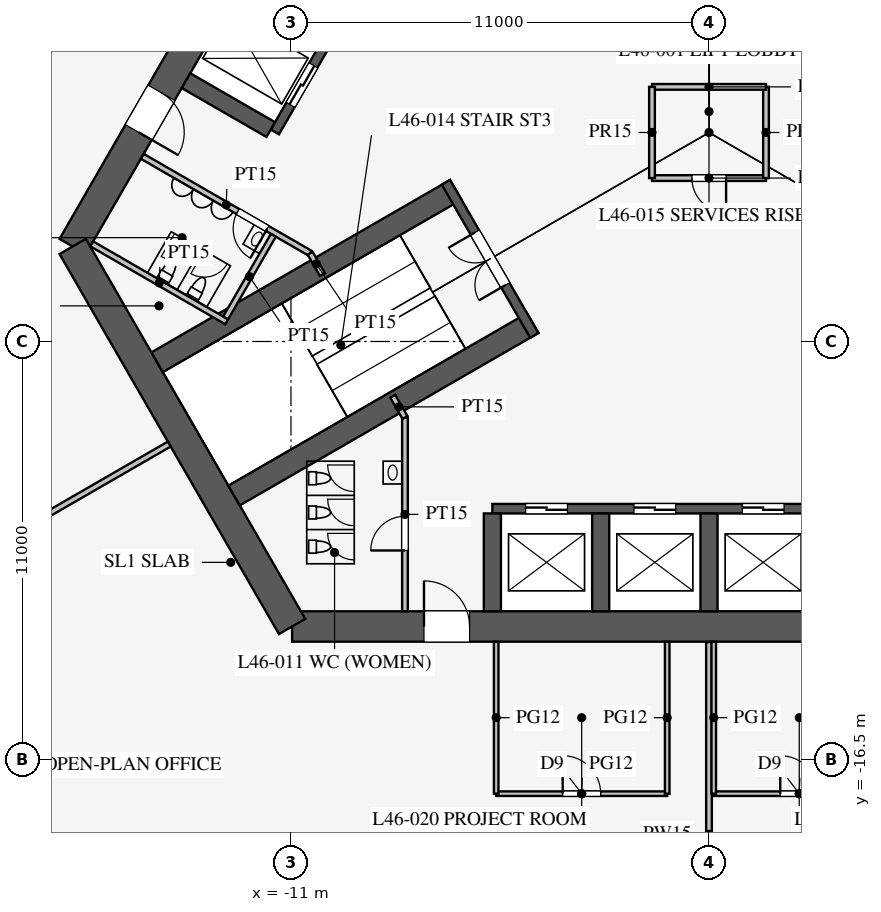
"""IFC4 building model, lengths in metres.
Left out: names, types, materials, properties, quantities, classifications, styles, units other than length and angle.
Written with IfcOpenShell. Run it as: python <this file> out.ifc"""

import sys

from ifc_helpers import new_model, si_unit, direction, frame, frame_2d, origin, place, context, subcontext, project, spatial, rectangle, extrude, element, fill, save


model = new_model("IFC4")
c1 = context("Model", 3, precision=1e-05, world=origin(), true_north=direction((0.0, 1.0)))
c2 = subcontext(c1, "Body", "Model", "MODEL_VIEW")
j1 = project(units=[si_unit("LENGTHUNIT", "METRE"), si_unit("PLANEANGLEUNIT", "RADIAN")], contexts=[c1])
p1 = place(None, origin())
s1 = spatial("IfcSite", under=j1, at=p1, CompositionType="ELEMENT")
p2 = place(p1, origin())
s2 = spatial("IfcBuilding", under=s1, at=p2, CompositionType="ELEMENT")
p3 = place(p2, frame((0.0, 0.0, 202.3)))
s3 = spatial("IfcBuildingStorey", under=s2, at=p3, CompositionType="ELEMENT", Elevation=202.3)
p4 = place(p3, frame((-10.97, -13.0, 0.0), z_axis=(0.0, 0.0, 1.0), x_axis=(1.0, 0.0, 0.0)))
e1 = element("IfcWall", 1, at=p4, inside=s3, PredefinedType="SHEAR", context=c2, shape_type="SweptSolid", body=[
    extrude(rectangle(XDim=21.939, YDim=0.8, at=frame_2d((10.97, 0.0))), origin(), (0.0, 0.0, 1.0), 4.2),
])
p5 = place(p4, frame((17.27, 0.0, 0.0)))
e2 = element("IfcOpeningElement", 2, at=p5, cuts=e1, PredefinedType="OPENING", context=c2, shape_type="SweptSolid", body=[
    extrude(rectangle(XDim=1.2, YDim=2.1, at=frame_2d((0.6, 1.05))), frame((0.0, 0.41, 0.0), z_axis=(0.0, -1.0, 0.0), x_axis=(1.0, 0.0, 0.0)), (0.0, 0.0, 1.0), 0.82),
])
p6 = place(p4, frame((3.47, 0.0, 0.0)))
e3 = element("IfcOpeningElement", 3, at=p6, cuts=e1, PredefinedType="OPENING", context=c2, shape_type="SweptSolid", body=[
    extrude(rectangle(XDim=1.2, YDim=2.1, at=frame_2d((0.6, 1.05))), frame((0.0, 0.41, 0.0), z_axis=(0.0, -1.0, 0.0), x_axis=(1.0, 0.0, 0.0)), (0.0, 0.0, 1.0), 0.82),
])
p7 = place(p3, frame((-5.773, 16.0, 0.0), z_axis=(0.0, 0.0, 1.0), x_axis=(-0.500002442456, -0.866023993627, 0.0)))
e4 = element("IfcWall", 4, at=p7, inside=s3, PredefinedType="SHEAR", context=c2, shape_type="SweptSolid", body=[
    extrude(rectangle(XDim=21.939, YDim=0.8, at=frame_2d((10.97, 0.0))), origin(), (0.0, 0.0, 1.0), 4.2),
])
p8 = place(p7, frame((17.27, 0.0, 0.0)))
e5 = element("IfcOpeningElement", 5, at=p8, cuts=e4, PredefinedType="OPENING", context=c2, shape_type="SweptSolid", body=[
    extrude(rectangle(XDim=1.2, YDim=2.1, at=frame_2d((0.6, 1.05))), frame((0.0, 0.41, 0.0), z_axis=(0.0, -1.0, 0.0), x_axis=(1.0, 0.0, 0.0)), (0.0, 0.0, 1.0), 0.82),
])
p9 = place(p7, frame((3.47, 0.0, 0.0)))
e6 = element("IfcOpeningElement", 6, at=p9, cuts=e4, PredefinedType="OPENING", context=c2, shape_type="SweptSolid", body=[
    extrude(rectangle(XDim=1.2, YDim=2.1, at=frame_2d((0.6, 1.05))), frame((0.0, 0.41, 0.0), z_axis=(0.0, -1.0, 0.0), x_axis=(1.0, 0.0, 0.0)), (0.0, 0.0, 1.0), 0.82),
])
p10 = place(p3, frame((-16.743, -3.0, 0.0), z_axis=(0.0, 0.0, 1.0), x_axis=(0.499995765644, -0.866027848477, 0.0)))
e7 = element("IfcWall", 7, at=p10, inside=s3, PredefinedType="SHEAR", context=c2, shape_type="SweptSolid", body=[
    extrude(rectangle(XDim=11.547, YDim=0.8, at=frame_2d((5.773, 0.0))), origin(), (0.0, 0.0, 1.0), 4.2),
])
p11 = place(p3, frame((-5.7, -9.9, 0.0), z_axis=(0.0, 0.0, 1.0), x_axis=(1.0, 0.0, 0.0)))
e8 = element("IfcWall", 8, at=p11, inside=s3, PredefinedType="SHEAR", context=c2, shape_type="SweptSolid", body=[
    extrude(rectangle(XDim=11.4, YDim=0.25, at=frame_2d((5.7, 0.0))), origin(), (0.0, 0.0, 1.0), 4.2),
])
p12 = place(p11, frame((0.875, 0.0, 0.0)))
e9 = element("IfcOpeningElement", 9, at=p12, cuts=e8, PredefinedType="OPENING", context=c2, shape_type="SweptSolid", body=[
    extrude(rectangle(XDim=1.1, YDim=2.2, at=frame_2d((0.55, 1.1))), frame((0.0, 0.135, 0.0), z_axis=(0.0, -1.0, 0.0), x_axis=(1.0, 0.0, 0.0)), (0.0, 0.0, 1.0), 0.27),
])
p13 = place(p11, frame((3.725, 0.0, 0.0)))
e10 = element("IfcOpeningElement", 10, at=p13, cuts=e8, PredefinedType="OPENING", context=c2, shape_type="SweptSolid", body=[
    extrude(rectangle(XDim=1.1, YDim=2.2, at=frame_2d((0.55, 1.1))), frame((0.0, 0.135, 0.0), z_axis=(0.0, -1.0, 0.0), x_axis=(1.0, 0.0, 0.0)), (0.0, 0.0, 1.0), 0.27),
])
p14 = place(p11, frame((6.575, 0.0, 0.0)))
e11 = element("IfcOpeningElement", 11, at=p14, cuts=e8, PredefinedType="OPENING", context=c2, shape_type="SweptSolid", body=[
    extrude(rectangle(XDim=1.1, YDim=2.2, at=frame_2d((0.55, 1.1))), frame((0.0, 0.135, 0.0), z_axis=(0.0, -1.0, 0.0), x_axis=(1.0, 0.0, 0.0)), (0.0, 0.0, 1.0), 0.27),
])
p15 = place(p11, frame((9.425, 0.0, 0.0)))
e12 = element("IfcOpeningElement", 12, at=p15, cuts=e8, PredefinedType="OPENING", context=c2, shape_type="SweptSolid", body=[
    extrude(rectangle(XDim=1.1, YDim=2.2, at=frame_2d((0.55, 1.1))), frame((0.0, 0.135, 0.0), z_axis=(0.0, -1.0, 0.0), x_axis=(1.0, 0.0, 0.0)), (0.0, 0.0, 1.0), 0.27),
])
for number, where, z_axis, x_axis in (
    (13, (-5.7, -10.025, 0.0), (0.0, 0.0, 1.0), (0.0, -1.0, 0.0)),
    (14, (-2.85, -10.025, 0.0), (0.0, 0.0, 1.0), (0.0, -1.0, 0.0)),
    (15, (0.0, -10.025, 0.0), (0.0, 0.0, 1.0), (0.0, -1.0, 0.0)),
):
    element("IfcWall", number, at=place(p3, frame(where, z_axis=z_axis, x_axis=x_axis)), inside=s3, PredefinedType="SHEAR", context=c2, shape_type="SweptSolid", body=[
        extrude(rectangle(XDim=2.575, YDim=0.45, at=frame_2d((1.288, 0.0))), origin(), (0.0, 0.0, 1.0), 4.2),
    ])
p16 = place(p3, frame((-5.724, 9.886, 0.0), z_axis=(0.0, 0.0, 1.0), x_axis=(-0.500001763848, -0.866024385424, 0.0)))
e16 = element("IfcWall", 16, at=p16, inside=s3, PredefinedType="SHEAR", context=c2, shape_type="SweptSolid", body=[
    extrude(rectangle(XDim=11.4, YDim=0.25, at=frame_2d((5.7, 0.0))), origin(), (0.0, 0.0, 1.0), 4.2),
])
p17 = place(p16, frame((6.525, 0.0, 0.0)))
e17 = element("IfcOpeningElement", 17, at=p17, cuts=e16, PredefinedType="OPENING", context=c2, shape_type="SweptSolid", body=[
    extrude(rectangle(XDim=1.2, YDim=2.2, at=frame_2d((0.6, 1.1))), frame((0.0, 0.135, 0.0), z_axis=(0.0, -1.0, 0.0), x_axis=(1.0, 0.0, 0.0)), (0.0, 0.0, 1.0), 0.27),
])
p18 = place(p16, frame((9.375, 0.0, 0.0)))
e18 = element("IfcOpeningElement", 18, at=p18, cuts=e16, PredefinedType="OPENING", context=c2, shape_type="SweptSolid", body=[
    extrude(rectangle(XDim=1.2, YDim=2.2, at=frame_2d((0.6, 1.1))), frame((0.0, 0.135, 0.0), z_axis=(0.0, -1.0, 0.0), x_axis=(1.0, 0.0, 0.0)), (0.0, 0.0, 1.0), 0.27),
])
p19 = place(p3, frame((-11.532, 0.076, 0.0), z_axis=(0.0, 0.0, 1.0), x_axis=(-0.866005588531, 0.500034319456, 0.0)))
e19 = element("IfcWall", 19, at=p19, inside=s3, PredefinedType="SHEAR", context=c2, shape_type="SweptSolid", body=[
    extrude(rectangle(XDim=2.575, YDim=0.45, at=frame_2d((1.288, 0.0))), origin(), (0.0, 0.0, 1.0), 4.2),
])
for number, where, z_axis, x_axis in (
    (20, (-6.663, -1.509, 0.0), (0.0, 0.0, 1.0), (-0.866, -0.5, 0.0)),
    (21, (-4.638, -5.016, 0.0), (0.0, 0.0, 1.0), (-0.866, -0.5, 0.0)),
):
    element("IfcWall", number, at=place(p3, frame(where, z_axis=z_axis, x_axis=x_axis)), inside=s3, PredefinedType="SHEAR", context=c2, shape_type="SweptSolid", body=[
        extrude(rectangle(XDim=9.075, YDim=0.6, at=frame_2d((4.538, 0.0))), origin(), (0.0, 0.0, 1.0), 4.2),
    ])
p20 = place(p3, frame((-6.922, -1.312, 0.0), z_axis=(0.0, 0.0, 1.0), x_axis=(0.499984536904, -0.866034331223, 0.0)))
e22 = element("IfcWall", 22, at=p20, inside=s3, PredefinedType="SHEAR", context=c2, shape_type="SweptSolid", body=[
    extrude(rectangle(XDim=4.65, YDim=0.25, at=frame_2d((2.325, 0.0))), origin(), (0.0, 0.0, 1.0), 4.2),
])
p21 = place(p20, frame((1.525, 0.0, 0.0)))
e23 = element("IfcOpeningElement", 23, at=p21, cuts=e22, PredefinedType="OPENING", context=c2, shape_type="SweptSolid", body=[
    extrude(rectangle(XDim=1.6, YDim=2.1, at=frame_2d((0.8, 1.05))), frame((0.0, 0.135, 0.0), z_axis=(0.0, -1.0, 0.0), x_axis=(1.0, 0.0, 0.0)), (0.0, 0.0, 1.0), 0.27),
])
p22 = place(p3, frame((-8.0, -7.5, 0.0), z_axis=(0.0, 0.0, 1.0), x_axis=(0.0, -1.0, 0.0)))
e24 = element("IfcWall", 24, at=p22, inside=s3, PredefinedType="PARTITIONING", context=c2, shape_type="SweptSolid", body=[
    extrude(rectangle(XDim=5.1, YDim=0.15, at=frame_2d((2.55, 0.0))), origin(), (0.0, 0.0, 1.0), 4.0),
])
p23 = place(p22, frame((2.6, 0.0, 0.0)))
e25 = element("IfcOpeningElement", 25, at=p23, cuts=e24, PredefinedType="OPENING", context=c2, shape_type="SweptSolid", body=[
    extrude(rectangle(XDim=0.9, YDim=2.1, at=frame_2d((0.45, 1.05))), frame((0.0, 0.085, 0.0), z_axis=(0.0, -1.0, 0.0), x_axis=(1.0, 0.0, 0.0)), (0.0, 0.0, 1.0), 0.17),
])
p24 = place(p3, frame((-10.495, -3.178, 0.0), z_axis=(0.0, 0.0, 1.0), x_axis=(-0.86602216432, 0.500005610874, 0.0)))
e26 = element("IfcWall", 26, at=p24, inside=s3, PredefinedType="PARTITIONING", context=c2, shape_type="SweptSolid", body=[
    extrude(rectangle(XDim=5.1, YDim=0.15, at=frame_2d((2.55, 0.0))), origin(), (0.0, 0.0, 1.0), 4.0),
])
p25 = place(p24, frame((1.3, 0.0, 0.0)))
e27 = element("IfcOpeningElement", 27, at=p25, cuts=e26, PredefinedType="OPENING", context=c2, shape_type="SweptSolid", body=[
    extrude(rectangle(XDim=0.9, YDim=2.1, at=frame_2d((0.45, 1.05))), frame((0.0, 0.085, 0.0), z_axis=(0.0, -1.0, 0.0), x_axis=(1.0, 0.0, 0.0)), (0.0, 0.0, 1.0), 0.17),
])
for number, where, z_axis, x_axis in (
    (28, (-10.495, -3.178, 0.0), (0.0, 0.0, 1.0), (0.5, -0.866, 0.0)),
    (29, (-8.0, -7.5, 0.0), (0.0, 0.0, 1.0), (-0.5, 0.866, 0.0)),
):
    element("IfcWall", number, at=place(p3, frame(where, z_axis=z_axis, x_axis=x_axis)), inside=s3, PredefinedType="PARTITIONING", context=c2, shape_type="SweptSolid", body=[
        extrude(rectangle(XDim=0.645, YDim=0.15, at=frame_2d((0.323, 0.0))), origin(), (0.0, 0.0, 1.0), 4.0),
    ])
p26 = place(p3, frame((-12.691, -4.982, 0.0), z_axis=(0.0, 0.0, 1.0), x_axis=(-0.8660249478, 0.500000789788, 0.0)))
e30 = element("IfcWall", 30, at=p26, inside=s3, PredefinedType="PARTITIONING", context=c2, shape_type="SweptSolid", body=[
    extrude(rectangle(XDim=4.1, YDim=0.15, at=frame_2d((2.05, 0.0))), origin(), (0.0, 0.0, 1.0), 4.0),
])
p27 = place(p3, frame((-11.464, -2.706, 0.0), z_axis=(0.0, 0.0, 1.0), x_axis=(-0.50001992892, -0.866013897511, 0.0)))
e31 = element("IfcWall", 31, at=p27, inside=s3, PredefinedType="PARTITIONING", context=c2, shape_type="SweptSolid", body=[
    extrude(rectangle(XDim=2.51, YDim=0.15, at=frame_2d((1.255, 0.0))), origin(), (0.0, 0.0, 1.0), 4.0),
])
p28 = place(p3, frame((-1.5, -1.2, 0.0), z_axis=(0.0, 0.0, 1.0), x_axis=(1.0, 0.0, 0.0)))
e32 = element("IfcWall", 32, at=p28, inside=s3, PredefinedType="PARTITIONING", context=c2, shape_type="SweptSolid", body=[
    extrude(rectangle(XDim=3.0, YDim=0.15, at=frame_2d((1.5, 0.0))), origin(), (0.0, 0.0, 1.0), 4.0),
])
p29 = place(p28, frame((1.05, 0.0, 0.0)))
e33 = element("IfcOpeningElement", 33, at=p29, cuts=e32, PredefinedType="OPENING", context=c2, shape_type="SweptSolid", body=[
    extrude(rectangle(XDim=0.9, YDim=2.1, at=frame_2d((0.45, 1.05))), frame((0.0, 0.085, 0.0), z_axis=(0.0, -1.0, 0.0), x_axis=(1.0, 0.0, 0.0)), (0.0, 0.0, 1.0), 0.17),
])
p30 = place(p3, frame((1.5, -1.2, 0.0), z_axis=(0.0, 0.0, 1.0), x_axis=(0.0, 1.0, 0.0)))
e34 = element("IfcWall", 34, at=p30, inside=s3, PredefinedType="PARTITIONING", context=c2, shape_type="SweptSolid", body=[
    extrude(rectangle(XDim=2.4, YDim=0.15, at=frame_2d((1.2, 0.0))), origin(), (0.0, 0.0, 1.0), 4.0),
])
p31 = place(p3, frame((1.5, 1.2, 0.0), z_axis=(0.0, 0.0, 1.0), x_axis=(-1.0, 0.0, 0.0)))
e35 = element("IfcWall", 35, at=p31, inside=s3, PredefinedType="PARTITIONING", context=c2, shape_type="SweptSolid", body=[
    extrude(rectangle(XDim=3.0, YDim=0.15, at=frame_2d((1.5, 0.0))), origin(), (0.0, 0.0, 1.0), 4.0),
])
p32 = place(p3, frame((-1.5, 1.2, 0.0), z_axis=(0.0, 0.0, 1.0), x_axis=(0.0, -1.0, 0.0)))
e36 = element("IfcWall", 36, at=p32, inside=s3, PredefinedType="PARTITIONING", context=c2, shape_type="SweptSolid", body=[
    extrude(rectangle(XDim=2.4, YDim=0.15, at=frame_2d((1.2, 0.0))), origin(), (0.0, 0.0, 1.0), 4.0),
])
p33 = place(p3, frame((-14.203, -8.2, 0.0), z_axis=(0.0, 0.0, 1.0), x_axis=(-0.866021600284, -0.500006587798, 0.0)))
e37 = element("IfcWall", 37, at=p33, inside=s3, PredefinedType="PARTITIONING", context=c2, shape_type="SweptSolid", body=[
    extrude(rectangle(XDim=14.95, YDim=0.15, at=frame_2d((7.475, 0.0))), origin(), (0.0, 0.0, 1.0), 2.4),
])
p34 = place(p3, frame((0.0, -13.41, 0.0), z_axis=(0.0, 0.0, 1.0), x_axis=(0.0, -1.0, 0.0)))
e38 = element("IfcWall", 38, at=p34, inside=s3, PredefinedType="PARTITIONING", context=c2, shape_type="SweptSolid", body=[
    extrude(rectangle(XDim=10.111, YDim=0.15, at=frame_2d((5.055, 0.0))), origin(), (0.0, 0.0, 1.0), 3.3),
])
p35 = place(p3, frame((0.125, -17.4, 0.0), z_axis=(0.0, 0.0, 1.0), x_axis=(1.0, 0.0, 0.0)))
e39 = element("IfcWall", 39, at=p35, inside=s3, PredefinedType="PARTITIONING", context=c2, shape_type="SweptSolid", body=[
    extrude(rectangle(XDim=4.5, YDim=0.12, at=frame_2d((2.25, 0.0))), origin(), (0.0, 0.0, 1.0), 2.9),
])
p36 = place(p35, frame((1.75, 0.0, 0.15)))
e40 = element("IfcOpeningElement", 40, at=p36, cuts=e39, PredefinedType="OPENING", context=c2, shape_type="SweptSolid", body=[
    extrude(rectangle(XDim=1.0, YDim=2.1, at=frame_2d((0.5, 1.05))), frame((0.0, 0.07, 0.0), z_axis=(0.0, -1.0, 0.0), x_axis=(1.0, 0.0, 0.0)), (0.0, 0.0, 1.0), 0.14),
])
p37 = place(p3, frame((-5.6, -17.4, 0.0), z_axis=(0.0, 0.0, 1.0), x_axis=(1.0, 0.0, 0.0)))
e41 = element("IfcWall", 41, at=p37, inside=s3, PredefinedType="PARTITIONING", context=c2, shape_type="SweptSolid", body=[
    extrude(rectangle(XDim=4.5, YDim=0.12, at=frame_2d((2.25, 0.0))), origin(), (0.0, 0.0, 1.0), 2.9),
])
p38 = place(p37, frame((1.75, 0.0, 0.15)))
e42 = element("IfcOpeningElement", 42, at=p38, cuts=e41, PredefinedType="OPENING", context=c2, shape_type="SweptSolid", body=[
    extrude(rectangle(XDim=1.0, YDim=2.1, at=frame_2d((0.5, 1.05))), frame((0.0, 0.07, 0.0), z_axis=(0.0, -1.0, 0.0), x_axis=(1.0, 0.0, 0.0)), (0.0, 0.0, 1.0), 0.14),
])
for number, where, z_axis, x_axis in (
    (43, (0.125, -13.4, 0.0), (0.0, 0.0, 1.0), (0.0, -1.0, 0.0)),
    (44, (-1.1, -13.4, 0.0), (0.0, 0.0, 1.0), (0.0, -1.0, 0.0)),
    (45, (-5.6, -13.4, 0.0), (0.0, 0.0, 1.0), (0.0, -1.0, 0.0)),
):
    element("IfcWall", number, at=place(p3, frame(where, z_axis=z_axis, x_axis=x_axis)), inside=s3, PredefinedType="PARTITIONING", context=c2, shape_type="SweptSolid", body=[
        extrude(rectangle(XDim=4.0, YDim=0.12, at=frame_2d((2.0, 0.0))), origin(), (0.0, 0.0, 1.0), 2.9),
    ])
p39 = place(p23, frame((0.9, 0.0, 0.0), z_axis=(0.0, 0.0, 1.0), x_axis=(-1.0, 0.0, 0.0)))
e46 = element("IfcDoor", 46, at=p39, inside=s3, OperationType="SINGLE_SWING_LEFT", PredefinedType="DOOR", context=c2, shape_type="SweptSolid", body=[
    extrude(rectangle(XDim=0.9, YDim=2.1, at=frame_2d((0.45, 1.05))), frame((0.0, 0.025, 0.0), z_axis=(0.0, -1.0, 0.0), x_axis=(1.0, 0.0, 0.0)), (0.0, 0.0, 1.0), 0.05),
])
fill(e25, e46)
p40 = place(p25, origin())
e47 = element("IfcDoor", 47, at=p40, inside=s3, OperationType="SINGLE_SWING_LEFT", PredefinedType="DOOR", context=c2, shape_type="SweptSolid", body=[
    extrude(rectangle(XDim=0.9, YDim=2.1, at=frame_2d((0.45, 1.05))), frame((0.0, 0.025, 0.0), z_axis=(0.0, -1.0, 0.0), x_axis=(1.0, 0.0, 0.0)), (0.0, 0.0, 1.0), 0.05),
])
fill(e27, e47)
p41 = place(p29, frame((0.9, 0.0, 0.0), z_axis=(0.0, 0.0, 1.0), x_axis=(-1.0, 0.0, 0.0)))
e48 = element("IfcDoor", 48, at=p41, inside=s3, OperationType="SINGLE_SWING_LEFT", PredefinedType="DOOR", context=c2, shape_type="SweptSolid", body=[
    extrude(rectangle(XDim=0.9, YDim=2.1, at=frame_2d((0.45, 1.05))), frame((0.0, 0.025, 0.0), z_axis=(0.0, -1.0, 0.0), x_axis=(1.0, 0.0, 0.0)), (0.0, 0.0, 1.0), 0.05),
])
fill(e33, e48)
p42 = place(p21, frame((1.6, 0.0, 0.0), z_axis=(0.0, 0.0, 1.0), x_axis=(-1.0, 0.0, 0.0)))
e49 = element("IfcDoor", 49, at=p42, inside=s3, OperationType="DOUBLE_DOOR_SINGLE_SWING", PredefinedType="DOOR", context=c2, shape_type="SweptSolid", body=[
    extrude(rectangle(XDim=1.6, YDim=2.1, at=frame_2d((0.8, 1.05))), frame((0.0, 0.025, 0.0), z_axis=(0.0, -1.0, 0.0), x_axis=(1.0, 0.0, 0.0)), (0.0, 0.0, 1.0), 0.05),
])
fill(e23, e49)
p43 = place(p6, origin())
e50 = element("IfcDoor", 50, at=p43, inside=s3, OperationType="SINGLE_SWING_LEFT", PredefinedType="DOOR", context=c2, shape_type="SweptSolid", body=[
    extrude(rectangle(XDim=1.2, YDim=2.1, at=frame_2d((0.6, 1.05))), frame((0.0, 0.025, 0.0), z_axis=(0.0, -1.0, 0.0), x_axis=(1.0, 0.0, 0.0)), (0.0, 0.0, 1.0), 0.05),
])
fill(e3, e50)
p44 = place(p8, origin())
e51 = element("IfcDoor", 51, at=p44, inside=s3, OperationType="SINGLE_SWING_RIGHT", PredefinedType="DOOR", context=c2, shape_type="SweptSolid", body=[
    extrude(rectangle(XDim=1.2, YDim=2.1, at=frame_2d((0.6, 1.05))), frame((0.0, 0.025, 0.0), z_axis=(0.0, -1.0, 0.0), x_axis=(1.0, 0.0, 0.0)), (0.0, 0.0, 1.0), 0.05),
])
fill(e5, e51)
p45 = place(p38, origin())
e52 = element("IfcDoor", 52, at=p45, inside=s3, OperationType="SINGLE_SWING_LEFT", PredefinedType="DOOR", context=c2, shape_type="SweptSolid", body=[
    extrude(rectangle(XDim=1.0, YDim=2.1, at=frame_2d((0.5, 1.05))), frame((0.0, 0.025, 0.0), z_axis=(0.0, -1.0, 0.0), x_axis=(1.0, 0.0, 0.0)), (0.0, 0.0, 1.0), 0.05),
])
fill(e42, e52)
p46 = place(p36, origin())
e53 = element("IfcDoor", 53, at=p46, inside=s3, OperationType="SINGLE_SWING_LEFT", PredefinedType="DOOR", context=c2, shape_type="SweptSolid", body=[
    extrude(rectangle(XDim=1.0, YDim=2.1, at=frame_2d((0.5, 1.05))), frame((0.0, 0.025, 0.0), z_axis=(0.0, -1.0, 0.0), x_axis=(1.0, 0.0, 0.0)), (0.0, 0.0, 1.0), 0.05),
])
fill(e40, e53)
p47 = place(p12, origin())
e54 = element("IfcDoor", 54, at=p47, inside=s3, OperationType="DOUBLE_DOOR_SLIDING", PredefinedType="DOOR", context=c2, shape_type="SweptSolid", body=[
    extrude(rectangle(XDim=1.1, YDim=2.2, at=frame_2d((0.55, 1.1))), frame((0.0, 0.025, 0.0), z_axis=(0.0, -1.0, 0.0), x_axis=(1.0, 0.0, 0.0)), (0.0, 0.0, 1.0), 0.05),
])
fill(e9, e54)
p48 = place(p13, origin())
e55 = element("IfcDoor", 55, at=p48, inside=s3, OperationType="DOUBLE_DOOR_SLIDING", PredefinedType="DOOR", context=c2, shape_type="SweptSolid", body=[
    extrude(rectangle(XDim=1.1, YDim=2.2, at=frame_2d((0.55, 1.1))), frame((0.0, 0.025, 0.0), z_axis=(0.0, -1.0, 0.0), x_axis=(1.0, 0.0, 0.0)), (0.0, 0.0, 1.0), 0.05),
])
fill(e10, e55)
p49 = place(p14, origin())
e56 = element("IfcDoor", 56, at=p49, inside=s3, OperationType="DOUBLE_DOOR_SLIDING", PredefinedType="DOOR", context=c2, shape_type="SweptSolid", body=[
    extrude(rectangle(XDim=1.1, YDim=2.2, at=frame_2d((0.55, 1.1))), frame((0.0, 0.025, 0.0), z_axis=(0.0, -1.0, 0.0), x_axis=(1.0, 0.0, 0.0)), (0.0, 0.0, 1.0), 0.05),
])
fill(e11, e56)
p50 = place(p18, origin())
e57 = element("IfcDoor", 57, at=p50, inside=s3, OperationType="DOUBLE_DOOR_SLIDING", PredefinedType="DOOR", context=c2, shape_type="SweptSolid", body=[
    extrude(rectangle(XDim=1.2, YDim=2.2, at=frame_2d((0.6, 1.1))), frame((0.0, 0.025, 0.0), z_axis=(0.0, -1.0, 0.0), x_axis=(1.0, 0.0, 0.0)), (0.0, 0.0, 1.0), 0.05),
])
fill(e18, e57)
save(model, sys.argv[1])
